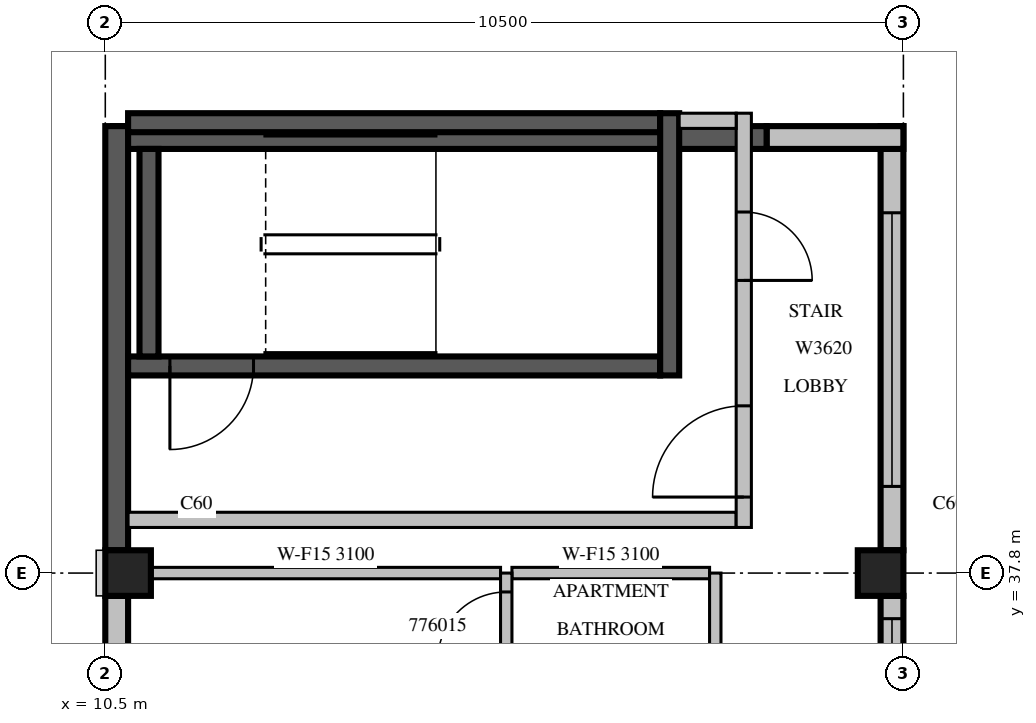
"""IFC4 building model, lengths in metres.
Left out: names, types, materials, properties, quantities, classifications, styles, units other than length and angle.
Written with IfcOpenShell. Run it as: python <this file> out.ifc"""

import sys

from ifc_helpers import new_model, si_unit, direction, frame, frame_2d, origin, origin_2d, place, context, subcontext, project, spatial, rectangle, extrude, source, transform, mapped, element, fill, save


model = new_model("IFC4")
c1 = context("Model", 3, precision=1e-05, world=origin(), true_north=direction((0.0, 1.0)))
c2 = subcontext(c1, "Body", "Model", "MODEL_VIEW")
j1 = project(units=[si_unit("LENGTHUNIT", "METRE"), si_unit("PLANEANGLEUNIT", "RADIAN")], contexts=[c1])
p1 = place(None, origin())
s1 = spatial("IfcSite", under=j1, at=p1, CompositionType="ELEMENT")
p2 = place(p1, origin())
s2 = spatial("IfcBuilding", under=s1, at=p2, CompositionType="ELEMENT")
p3 = place(p2, frame((0.0, 0.0, 326.5)))
s3 = spatial("IfcBuildingStorey", under=s2, at=p3, CompositionType="ELEMENT", Elevation=326.5)
m1 = source(origin(), c2, "Body", "SweptSolid", [
    extrude(rectangle(XDim=0.6, YDim=0.6, at=origin_2d()), origin(), (0.0, 0.0, 1.0), 3.5),
])
for number, where, z_axis, x_axis in (
    (1, (10.8, 37.8, 0.0), (0.0, 0.0, 1.0), (1.0, 0.0, 0.0)),
    (2, (20.7, 37.8, 0.0), (0.0, 0.0, 1.0), (1.0, 0.0, 0.0)),
):
    element("IfcColumn", number, at=place(p3, frame(where, z_axis=z_axis, x_axis=x_axis)), inside=s3, PredefinedType="COLUMN", context=c2, shape_type="MappedRepresentation", body=[
        mapped(m1, transform((0.0, 0.0, 0.0), scale=1.0)),
    ])
p4 = place(p3, frame((20.85, 29.7, 0.0), z_axis=(0.0, 0.0, 1.0), x_axis=(0.0, 1.0, 0.0)))
e3 = element("IfcWall", 3, at=p4, inside=s3, PredefinedType="STANDARD", context=c2, shape_type="SweptSolid", body=[
    extrude(rectangle(XDim=7.8, YDim=0.3, at=frame_2d((3.9, 0.0))), origin(), (0.0, 0.0, 1.0), 2.6),
])
m2 = source(origin(), c2, "Body", "SweptSolid", [
    extrude(rectangle(XDim=3.0, YDim=2.0, at=frame_2d((1.5, 1.0))), frame((0.0, 0.16, 0.0), z_axis=(0.0, -1.0, 0.0), x_axis=(1.0, 0.0, 0.0)), (0.0, 0.0, 1.0), 0.32),
])
p5 = place(p4, frame((0.3, 0.0, 0.6)))
e4 = element("IfcOpeningElement", 4, at=p5, cuts=e3, PredefinedType="OPENING", context=c2, shape_type="MappedRepresentation", body=[
    mapped(m2, transform((0.0, 0.0, 0.0), scale=1.0)),
])
p6 = place(p4, frame((4.5, 0.0, 0.6)))
e5 = element("IfcOpeningElement", 5, at=p6, cuts=e3, PredefinedType="OPENING", context=c2, shape_type="MappedRepresentation", body=[
    mapped(m2, transform((0.0, 0.0, 0.0), scale=1.0)),
])
p7 = place(p3, frame((20.85, 38.1, 0.0), z_axis=(0.0, 0.0, 1.0), x_axis=(0.0, 1.0, 0.0)))
e6 = element("IfcWall", 6, at=p7, inside=s3, PredefinedType="STANDARD", context=c2, shape_type="SweptSolid", body=[
    extrude(rectangle(XDim=5.58, YDim=0.3, at=frame_2d((2.79, 0.0))), origin(), (0.0, 0.0, 1.0), 3.1),
])
m3 = source(origin(), c2, "Body", "SweptSolid", [
    extrude(rectangle(XDim=3.6, YDim=2.0, at=frame_2d((1.8, 1.0))), frame((0.0, 0.16, 0.0), z_axis=(0.0, -1.0, 0.0), x_axis=(1.0, 0.0, 0.0)), (0.0, 0.0, 1.0), 0.32),
])
p8 = place(p7, frame((0.84, 0.0, 0.6)))
e7 = element("IfcOpeningElement", 7, at=p8, cuts=e6, PredefinedType="OPENING", context=c2, shape_type="MappedRepresentation", body=[
    mapped(m3, transform((0.0, 0.0, 0.0), scale=1.0)),
])
m4 = source(origin(), c2, "Body", "SweptSolid", [
    extrude(rectangle(XDim=1.8, YDim=0.3, at=frame_2d((0.9, 0.0))), origin(), (0.0, 0.0, 1.0), 3.1),
])
p9 = place(p3, frame((21.0, 43.53, 0.0), z_axis=(0.0, 0.0, 1.0), x_axis=(-1.0, 0.0, 0.0)))
e8 = element("IfcWall", 8, at=p9, inside=s3, PredefinedType="STANDARD", context=c2, shape_type="MappedRepresentation", body=[
    mapped(m4, transform((0.0, 0.0, 0.0), scale=1.0)),
])
m5 = source(origin(), c2, "Body", "SweptSolid", [
    extrude(rectangle(XDim=8.6, YDim=0.3, at=frame_2d((4.3, 0.0))), origin(), (0.0, 0.0, 1.0), 3.1),
])
p10 = place(p3, frame((19.2, 43.53, 0.0), z_axis=(0.0, 0.0, 1.0), x_axis=(-1.0, 0.0, 0.0)))
e9 = element("IfcWall", 9, at=p10, inside=s3, PredefinedType="SOLIDWALL", context=c2, shape_type="MappedRepresentation", body=[
    mapped(m5, transform((0.0, 0.0, 0.0), scale=1.0)),
])
p11 = place(p3, frame((10.65, 43.68, 0.0), z_axis=(0.0, 0.0, 1.0), x_axis=(0.0, -1.0, 0.0)))
e10 = element("IfcWall", 10, at=p11, inside=s3, PredefinedType="SOLIDWALL", context=c2, shape_type="SweptSolid", body=[
    extrude(rectangle(XDim=5.58, YDim=0.3, at=frame_2d((2.79, 0.0))), origin(), (0.0, 0.0, 1.0), 3.1),
])
m6 = source(origin(), c2, "Body", "SweptSolid", [
    extrude(rectangle(XDim=7.8, YDim=0.3, at=frame_2d((3.9, 0.0))), origin(), (0.0, 0.0, 1.0), 2.6),
])
p12 = place(p3, frame((10.65, 37.5, 0.0), z_axis=(0.0, 0.0, 1.0), x_axis=(0.0, -1.0, 0.0)))
e11 = element("IfcWall", 11, at=p12, inside=s3, PredefinedType="STANDARD", context=c2, shape_type="MappedRepresentation", body=[
    mapped(m6, transform((0.0, 0.0, 0.0), scale=1.0)),
])
m7 = source(origin(), c2, "Body", "SweptSolid", [
    extrude(rectangle(XDim=1.2, YDim=2.0, at=frame_2d((0.6, 1.0))), frame((0.0, 0.16, 0.0), z_axis=(0.0, -1.0, 0.0), x_axis=(1.0, 0.0, 0.0)), (0.0, 0.0, 1.0), 0.32),
])
p13 = place(p12, frame((4.348, 0.0, 0.6)))
e12 = element("IfcOpeningElement", 12, at=p13, cuts=e11, PredefinedType="OPENING", context=c2, shape_type="MappedRepresentation", body=[
    mapped(m7, transform((0.0, 0.0, 0.0), scale=1.0)),
])
m8 = source(origin(), c2, "Body", "SweptSolid", [
    extrude(rectangle(XDim=2.4, YDim=2.0, at=frame_2d((1.2, 1.0))), frame((0.0, 0.16, 0.0), z_axis=(0.0, -1.0, 0.0), x_axis=(1.0, 0.0, 0.0)), (0.0, 0.0, 1.0), 0.32),
])
p14 = place(p12, frame((0.974, 0.0, 0.6)))
e13 = element("IfcOpeningElement", 13, at=p14, cuts=e11, PredefinedType="OPENING", context=c2, shape_type="MappedRepresentation", body=[
    mapped(m8, transform((0.0, 0.0, 0.0), scale=1.0)),
])
m9 = source(origin(), c2, "Body", "SweptSolid", [
    extrude(rectangle(XDim=7.0, YDim=0.25, at=frame_2d((3.5, 0.0))), origin(), (0.0, 0.0, 1.0), 3.1),
])
p15 = place(p3, frame((10.8, 40.525, 0.0), z_axis=(0.0, 0.0, 1.0), x_axis=(1.0, 0.0, 0.0)))
e14 = element("IfcWall", 14, at=p15, inside=s3, PredefinedType="SOLIDWALL", context=c2, shape_type="MappedRepresentation", body=[
    mapped(m9, transform((0.0, 0.0, 0.0), scale=1.0)),
])
m10 = source(origin(), c2, "Body", "SweptSolid", [
    extrude(rectangle(XDim=1.1, YDim=2.1, at=frame_2d((0.55, 1.05))), frame((0.0, 0.135, 0.0), z_axis=(0.0, -1.0, 0.0), x_axis=(1.0, 0.0, 0.0)), (0.0, 0.0, 1.0), 0.27),
])
p16 = place(p15, frame((0.55, 0.0, 0.0)))
e15 = element("IfcOpeningElement", 15, at=p16, cuts=e14, PredefinedType="OPENING", context=c2, shape_type="MappedRepresentation", body=[
    mapped(m10, transform((0.0, 0.0, 0.0), scale=1.0)),
])
p17 = place(p3, frame((10.8, 43.725, 0.0), z_axis=(0.0, 0.0, 1.0), x_axis=(1.0, 0.0, 0.0)))
e16 = element("IfcWall", 16, at=p17, inside=s3, PredefinedType="SOLIDWALL", context=c2, shape_type="MappedRepresentation", body=[
    mapped(m9, transform((0.0, 0.0, 0.0), scale=1.0)),
])
m11 = source(origin(), c2, "Body", "SweptSolid", [
    extrude(rectangle(XDim=3.45, YDim=0.25, at=frame_2d((1.725, 0.0))), origin(), (0.0, 0.0, 1.0), 3.1),
])
p18 = place(p3, frame((17.925, 40.4, 0.0), z_axis=(0.0, 0.0, 1.0), x_axis=(0.0, 1.0, 0.0)))
e17 = element("IfcWall", 17, at=p18, inside=s3, PredefinedType="SOLIDWALL", context=c2, shape_type="MappedRepresentation", body=[
    mapped(m11, transform((0.0, 0.0, 0.0), scale=1.0)),
])
m12 = source(origin(), c2, "Body", "SweptSolid", [
    extrude(rectangle(XDim=2.73, YDim=0.25, at=frame_2d((1.365, 0.0))), origin(), (0.0, 0.0, 1.0), 3.1),
])
p19 = place(p3, frame((11.075, 40.65, 0.0), z_axis=(0.0, 0.0, 1.0), x_axis=(0.0, 1.0, 0.0)))
e18 = element("IfcWall", 18, at=p19, inside=s3, PredefinedType="SOLIDWALL", context=c2, shape_type="MappedRepresentation", body=[
    mapped(m12, transform((0.0, 0.0, 0.0), scale=1.0)),
])
m13 = source(origin(), c2, "Body", "SweptSolid", [
    extrude(rectangle(XDim=8.0, YDim=0.2, at=frame_2d((4.0, 0.0))), origin(), (0.0, 0.0, 1.0), 3.1),
])
p20 = place(p3, frame((10.8, 38.5, 0.0), z_axis=(0.0, 0.0, 1.0), x_axis=(1.0, 0.0, 0.0)))
e19 = element("IfcWall", 19, at=p20, inside=s3, PredefinedType="PARTITIONING", context=c2, shape_type="MappedRepresentation", body=[
    mapped(m13, transform((0.0, 0.0, 0.0), scale=1.0)),
])
m14 = source(origin(), c2, "Body", "SweptSolid", [
    extrude(rectangle(XDim=5.45, YDim=0.2, at=frame_2d((2.725, 0.0))), origin(), (0.0, 0.0, 1.0), 3.1),
])
p21 = place(p3, frame((18.9, 38.4, 0.0), z_axis=(0.0, 0.0, 1.0), x_axis=(0.0, 1.0, 0.0)))
e20 = element("IfcWall", 20, at=p21, inside=s3, PredefinedType="PARTITIONING", context=c2, shape_type="MappedRepresentation", body=[
    mapped(m14, transform((0.0, 0.0, 0.0), scale=1.0)),
])
m15 = source(origin(), c2, "Body", "SweptSolid", [
    extrude(rectangle(XDim=1.2, YDim=2.1, at=frame_2d((0.6, 1.05))), frame((0.0, 0.11, 0.0), z_axis=(0.0, -1.0, 0.0), x_axis=(1.0, 0.0, 0.0)), (0.0, 0.0, 1.0), 0.22),
])
p22 = place(p21, frame((0.4, 0.0, 0.0)))
e21 = element("IfcOpeningElement", 21, at=p22, cuts=e20, PredefinedType="OPENING", context=c2, shape_type="MappedRepresentation", body=[
    mapped(m15, transform((0.0, 0.0, 0.0), scale=1.0)),
])
m16 = source(origin(), c2, "Body", "SweptSolid", [
    extrude(rectangle(XDim=0.9, YDim=2.1, at=frame_2d((0.45, 1.05))), frame((0.0, 0.11, 0.0), z_axis=(0.0, -1.0, 0.0), x_axis=(1.0, 0.0, 0.0)), (0.0, 0.0, 1.0), 0.22),
])
p23 = place(p21, frame((3.25, 0.0, 0.0)))
e22 = element("IfcOpeningElement", 22, at=p23, cuts=e20, PredefinedType="OPENING", context=c2, shape_type="MappedRepresentation", body=[
    mapped(m16, transform((0.0, 0.0, 0.0), scale=1.0)),
])
m17 = source(origin(), c2, "Body", "SweptSolid", [
    extrude(rectangle(XDim=0.75, YDim=0.2, at=frame_2d((0.375, 0.0))), origin(), (0.0, 0.0, 1.0), 3.1),
])
p24 = place(p3, frame((18.05, 43.75, 0.0), z_axis=(0.0, 0.0, 1.0), x_axis=(1.0, 0.0, 0.0)))
e23 = element("IfcWall", 23, at=p24, inside=s3, PredefinedType="PARTITIONING", context=c2, shape_type="MappedRepresentation", body=[
    mapped(m17, transform((0.0, 0.0, 0.0), scale=1.0)),
])
m18 = source(origin(), c2, "Body", "SweptSolid", [
    extrude(rectangle(XDim=4.601, YDim=0.15, at=frame_2d((2.3, 0.0))), origin(), (0.0, 0.0, 1.0), 3.1),
])
p25 = place(p3, frame((15.7, 37.8, 0.0), z_axis=(0.0, 0.0, 1.0), x_axis=(-1.0, 0.0, 0.0)))
e24 = element("IfcWall", 24, at=p25, inside=s3, PredefinedType="PARTITIONING", context=c2, shape_type="MappedRepresentation", body=[
    mapped(m18, transform((0.0, 0.0, 0.0), scale=1.0)),
])
m19 = source(origin(), c2, "Body", "SweptSolid", [
    extrude(rectangle(XDim=2.6, YDim=0.15, at=frame_2d((1.3, 0.0))), origin(), (0.0, 0.0, 1.0), 3.1),
])
p26 = place(p3, frame((18.45, 37.8, 0.0), z_axis=(0.0, 0.0, 1.0), x_axis=(-1.0, 0.0, 0.0)))
e25 = element("IfcWall", 25, at=p26, inside=s3, PredefinedType="PARTITIONING", context=c2, shape_type="MappedRepresentation", body=[
    mapped(m19, transform((0.0, 0.0, 0.0), scale=1.0)),
])
m20 = source(origin(), c2, "Body", "SweptSolid", [
    extrude(rectangle(XDim=8.4, YDim=0.15, at=frame_2d((4.2, 0.0))), origin(), (0.0, 0.0, 1.0), 2.6),
])
p27 = place(p3, frame((15.775, 29.4, 0.0), z_axis=(0.0, 0.0, 1.0), x_axis=(0.0, 1.0, 0.0)))
e26 = element("IfcWall", 26, at=p27, inside=s3, PredefinedType="PARTITIONING", context=c2, shape_type="MappedRepresentation", body=[
    mapped(m20, transform((0.0, 0.0, 0.0), scale=1.0)),
])
m21 = source(origin(), c2, "Body", "SweptSolid", [
    extrude(rectangle(XDim=1.0, YDim=2.1, at=frame_2d((0.5, 1.05))), frame((0.0, 0.085, 0.0), z_axis=(0.0, -1.0, 0.0), x_axis=(1.0, 0.0, 0.0)), (0.0, 0.0, 1.0), 0.17),
])
p28 = place(p27, frame((3.068, 0.0, 0.0)))
e27 = element("IfcOpeningElement", 27, at=p28, cuts=e26, PredefinedType="OPENING", context=c2, shape_type="MappedRepresentation", body=[
    mapped(m21, transform((0.0, 0.0, 0.0), scale=1.0)),
])
m22 = source(origin(), c2, "Body", "SweptSolid", [
    extrude(rectangle(XDim=0.9, YDim=2.1, at=frame_2d((0.45, 1.05))), frame((0.0, 0.085, 0.0), z_axis=(0.0, -1.0, 0.0), x_axis=(1.0, 0.0, 0.0)), (0.0, 0.0, 1.0), 0.17),
])
p29 = place(p27, frame((1.067, 0.0, 0.0)))
e28 = element("IfcOpeningElement", 28, at=p29, cuts=e26, PredefinedType="OPENING", context=c2, shape_type="MappedRepresentation", body=[
    mapped(m22, transform((0.0, 0.0, 0.0), scale=1.0)),
])
p30 = place(p27, frame((7.252, 0.0, 0.0)))
e29 = element("IfcOpeningElement", 29, at=p30, cuts=e26, PredefinedType="OPENING", context=c2, shape_type="MappedRepresentation", body=[
    mapped(m22, transform((0.0, 0.0, 0.0), scale=1.0)),
])
p31 = place(p3, frame((18.525, 29.4, 0.0), z_axis=(0.0, 0.0, 1.0), x_axis=(0.0, 1.0, 0.0)))
e30 = element("IfcWall", 30, at=p31, inside=s3, PredefinedType="PARTITIONING", context=c2, shape_type="MappedRepresentation", body=[
    mapped(m20, transform((0.0, 0.0, 0.0), scale=1.0)),
])
p32 = place(p31, frame((3.467, 0.0, 0.0)))
e31 = element("IfcOpeningElement", 31, at=p32, cuts=e30, PredefinedType="OPENING", context=c2, shape_type="MappedRepresentation", body=[
    mapped(m21, transform((0.0, 0.0, 0.0), scale=1.0)),
])
m23 = source(origin(), c2, "Body", "SweptSolid", [
    extrude(rectangle(XDim=3.0, YDim=2.0, at=frame_2d((1.5, 1.0))), frame((0.0, 0.03, 0.0), z_axis=(0.0, -1.0, 0.0), x_axis=(1.0, 0.0, 0.0)), (0.0, 0.0, 1.0), 0.06),
])
p33 = place(p6, origin())
e32 = element("IfcWindow", 32, at=p33, inside=s3, PartitioningType="SINGLE_PANEL", PredefinedType="WINDOW", context=c2, shape_type="MappedRepresentation", body=[
    mapped(m23, transform((0.0, 0.0, 0.0), scale=1.0)),
])
fill(e5, e32)
m24 = source(origin(), c2, "Body", "SweptSolid", [
    extrude(rectangle(XDim=3.6, YDim=2.0, at=frame_2d((1.8, 1.0))), frame((0.0, 0.03, 0.0), z_axis=(0.0, -1.0, 0.0), x_axis=(1.0, 0.0, 0.0)), (0.0, 0.0, 1.0), 0.06),
])
p34 = place(p8, origin())
e33 = element("IfcWindow", 33, at=p34, inside=s3, PartitioningType="SINGLE_PANEL", PredefinedType="WINDOW", context=c2, shape_type="MappedRepresentation", body=[
    mapped(m24, transform((0.0, 0.0, 0.0), scale=1.0)),
])
fill(e7, e33)
m25 = source(origin(), c2, "Body", "SweptSolid", [
    extrude(rectangle(XDim=1.1, YDim=2.1, at=frame_2d((0.55, 1.05))), frame((0.0, 0.025, 0.0), z_axis=(0.0, -1.0, 0.0), x_axis=(1.0, 0.0, 0.0)), (0.0, 0.0, 1.0), 0.05),
])
p35 = place(p16, origin())
e34 = element("IfcDoor", 34, at=p35, inside=s3, OperationType="SINGLE_SWING_RIGHT", PredefinedType="DOOR", context=c2, shape_type="MappedRepresentation", body=[
    mapped(m25, transform((0.0, 0.0, 0.0), scale=1.0)),
])
fill(e15, e34)
m26 = source(origin(), c2, "Body", "SweptSolid", [
    extrude(rectangle(XDim=1.2, YDim=2.1, at=frame_2d((0.6, 1.05))), frame((0.0, 0.025, 0.0), z_axis=(0.0, -1.0, 0.0), x_axis=(1.0, 0.0, 0.0)), (0.0, 0.0, 1.0), 0.05),
])
p36 = place(p22, origin())
e35 = element("IfcDoor", 35, at=p36, inside=s3, OperationType="SINGLE_SWING_LEFT", PredefinedType="DOOR", context=c2, shape_type="MappedRepresentation", body=[
    mapped(m26, transform((0.0, 0.0, 0.0), scale=1.0)),
])
fill(e21, e35)
m27 = source(origin(), c2, "Body", "SweptSolid", [
    extrude(rectangle(XDim=0.9, YDim=2.1, at=frame_2d((0.45, 1.05))), frame((0.0, 0.025, 0.0), z_axis=(0.0, -1.0, 0.0), x_axis=(1.0, 0.0, 0.0)), (0.0, 0.0, 1.0), 0.05),
])
p37 = place(p23, origin())
e36 = element("IfcDoor", 36, at=p37, inside=s3, OperationType="SINGLE_SWING_RIGHT", PredefinedType="DOOR", context=c2, shape_type="MappedRepresentation", body=[
    mapped(m27, transform((0.0, 0.0, 0.0), scale=1.0)),
])
fill(e22, e36)
p38 = place(p30, origin())
e37 = element("IfcDoor", 37, at=p38, inside=s3, OperationType="SINGLE_SWING_LEFT", PredefinedType="DOOR", context=c2, shape_type="MappedRepresentation", body=[
    mapped(m27, transform((0.0, 0.0, 0.0), scale=1.0)),
])
fill(e29, e37)
save(model, sys.argv[1])
